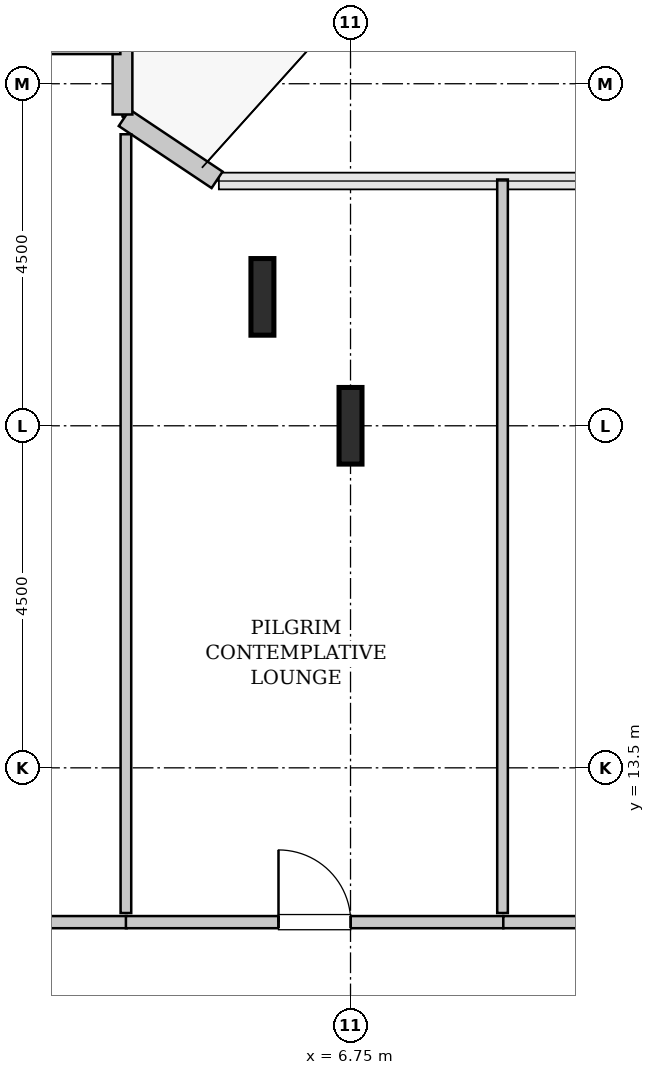
"""IFC4 building model, lengths in metres.
Left out: names, types, materials, properties, quantities, classifications, styles, units other than length and angle.
Written with IfcOpenShell. Run it as: python <this file> out.ifc"""

import sys

from ifc_helpers import new_model, si_unit, direction, frame, frame_2d, origin, origin_2d, place, context, subcontext, project, spatial, rectangle, i_section, extrude, source, transform, mapped, element, fill, save


model = new_model("IFC4")
c1 = context("Model", 3, precision=1e-05, world=origin(), true_north=direction((0.0, 1.0)))
c2 = subcontext(c1, "Body", "Model", "MODEL_VIEW")
j1 = project(units=[si_unit("LENGTHUNIT", "METRE"), si_unit("PLANEANGLEUNIT", "RADIAN")], contexts=[c1])
p1 = place(None, origin())
s1 = spatial("IfcSite", under=j1, at=p1, CompositionType="ELEMENT")
p2 = place(p1, origin())
s2 = spatial("IfcBuilding", under=s1, at=p2, CompositionType="ELEMENT")
p3 = place(p2, frame((0.0, 0.0, 78.6)))
s3 = spatial("IfcBuildingStorey", under=s2, at=p3, CompositionType="ELEMENT", Elevation=78.6)
m1 = source(origin(), c2, "Body", "SweptSolid", [
    extrude(i_section(OverallWidth=0.302, OverallDepth=1.008, WebThickness=0.021, FlangeThickness=0.04, FilletRadius=0.03, at=origin_2d()), origin(), (0.0, 0.0, 1.0), 3.8),
])
for number, where, z_axis, x_axis in (
    (1, (5.591, 19.696, 0.0), (0.0, 0.0, 1.0), (1.0, 0.0, 0.0)),
    (2, (6.75, 18.0, 0.0), (0.0, 0.0, 1.0), (1.0, 0.0, 0.0)),
):
    element("IfcColumn", number, at=place(p3, frame(where, z_axis=z_axis, x_axis=x_axis)), inside=s3, PredefinedType="COLUMN", context=c2, shape_type="MappedRepresentation", body=[
        mapped(m1, transform((0.0, 0.0, 0.0), x_axis=(1.0, 0.0, 0.0), y_axis=(0.0, 1.0, 0.0), z_axis=(0.0, 0.0, 1.0), scale=1.0)),
    ])
m2 = source(origin(), c2, "Body", "SweptSolid", [
    extrude(rectangle(XDim=1.469, YDim=0.26, at=frame_2d((0.734, 0.0))), origin(), (0.0, 0.0, 1.0), 3.55),
])
p4 = place(p3, frame((4.995, 21.236, 0.0), z_axis=(0.0, 0.0, 1.0), x_axis=(-0.831461760506, 0.555581983884, 0.0)))
e3 = element("IfcWall", 3, at=p4, inside=s3, PredefinedType="SOLIDWALL", context=c2, shape_type="MappedRepresentation", body=[
    mapped(m2, transform((0.0, 0.0, 0.0), x_axis=(1.0, 0.0, 0.0), y_axis=(0.0, 1.0, 0.0), z_axis=(0.0, 0.0, 1.0), scale=1.0)),
])
m3 = source(origin(), c2, "Body", "SweptSolid", [
    extrude(rectangle(XDim=0.897, YDim=0.26, at=frame_2d((0.448, 0.0))), origin(), (0.0, 0.0, 1.0), 3.55),
])
p5 = place(p3, frame((3.75, 22.095, 0.0), z_axis=(0.0, 0.0, 1.0), x_axis=(0.0, 1.0, 0.0)))
e4 = element("IfcWall", 4, at=p5, inside=s3, PredefinedType="SOLIDWALL", context=c2, shape_type="MappedRepresentation", body=[
    mapped(m3, transform((0.0, 0.0, 0.0), x_axis=(1.0, 0.0, 0.0), y_axis=(0.0, 1.0, 0.0), z_axis=(0.0, 0.0, 1.0), scale=1.0)),
])
m4 = source(origin(), c2, "Body", "SweptSolid", [
    extrude(rectangle(XDim=1.37, YDim=0.26, at=frame_2d((0.685, 0.0))), origin(), (0.0, 0.0, 1.0), 3.55),
])
p6 = place(p3, frame((3.722, 23.02, 0.0), z_axis=(0.0, 0.0, 1.0), x_axis=(-1.0, 0.0, 0.0)))
e5 = element("IfcWall", 5, at=p6, inside=s3, PredefinedType="SOLIDWALL", context=c2, shape_type="MappedRepresentation", body=[
    mapped(m4, transform((0.0, 0.0, 0.0), x_axis=(1.0, 0.0, 0.0), y_axis=(0.0, 1.0, 0.0), z_axis=(0.0, 0.0, 1.0), scale=1.0)),
])
m5 = source(origin(), c2, "Body", "SweptSolid", [
    extrude(rectangle(XDim=5.605, YDim=0.16, at=frame_2d((2.802, 0.0))), origin(), (0.0, 0.0, 1.0), 3.535),
])
p7 = place(p3, frame((-1.8, 11.47, 0.0), z_axis=(0.0, 0.0, 1.0), x_axis=(1.0, 0.0, 0.0)))
e6 = element("IfcWall", 6, at=p7, inside=s3, PredefinedType="PARTITIONING", context=c2, shape_type="MappedRepresentation", body=[
    mapped(m5, transform((0.0, 0.0, 0.0), x_axis=(1.0, 0.0, 0.0), y_axis=(0.0, 1.0, 0.0), z_axis=(0.0, 0.0, 1.0), scale=1.0)),
])
p8 = place(p7, frame((2.327, 0.0, 0.0)))
e7 = element("IfcOpeningElement", 7, at=p8, cuts=e6, PredefinedType="OPENING", context=c2, shape_type="SweptSolid", body=[
    extrude(rectangle(XDim=0.95, YDim=2.1, at=frame_2d((0.475, 1.05))), frame((0.0, 0.09, 0.0), z_axis=(0.0, -1.0, 0.0), x_axis=(1.0, 0.0, 0.0)), (0.0, 0.0, 1.0), 0.18),
])
m6 = source(origin(), c2, "Body", "SweptSolid", [
    extrude(rectangle(XDim=10.245, YDim=0.14, at=frame_2d((5.123, 0.0))), origin(), (0.0, 0.0, 1.0), 3.535),
])
p9 = place(p3, frame((3.795, 11.59, 0.0), z_axis=(0.0, 0.0, 1.0), x_axis=(0.0, 1.0, 0.0)))
e8 = element("IfcWall", 8, at=p9, inside=s3, PredefinedType="PARTITIONING", context=c2, shape_type="MappedRepresentation", body=[
    mapped(m6, transform((0.0, 0.0, 0.0), x_axis=(1.0, 0.0, 0.0), y_axis=(0.0, 1.0, 0.0), z_axis=(0.0, 0.0, 1.0), scale=1.0)),
])
m7 = source(origin(), c2, "Body", "SweptSolid", [
    extrude(rectangle(XDim=4.965, YDim=0.16, at=frame_2d((2.482, 0.0))), origin(), (0.0, 0.0, 1.0), 3.535),
])
p10 = place(p3, frame((3.795, 11.47, 0.0), z_axis=(0.0, 0.0, 1.0), x_axis=(1.0, 0.0, 0.0)))
e9 = element("IfcWall", 9, at=p10, inside=s3, PredefinedType="PARTITIONING", context=c2, shape_type="MappedRepresentation", body=[
    mapped(m7, transform((0.0, 0.0, 0.0), x_axis=(1.0, 0.0, 0.0), y_axis=(0.0, 1.0, 0.0), z_axis=(0.0, 0.0, 1.0), scale=1.0)),
])
p11 = place(p10, frame((2.008, 0.0, 0.0)))
e10 = element("IfcOpeningElement", 10, at=p11, cuts=e9, PredefinedType="OPENING", context=c2, shape_type="SweptSolid", body=[
    extrude(rectangle(XDim=0.95, YDim=2.1, at=frame_2d((0.475, 1.05))), frame((0.0, 0.09, 0.0), z_axis=(0.0, -1.0, 0.0), x_axis=(1.0, 0.0, 0.0)), (0.0, 0.0, 1.0), 0.18),
])
m8 = source(origin(), c2, "Body", "SweptSolid", [
    extrude(rectangle(XDim=9.65, YDim=0.14, at=frame_2d((4.825, 0.0))), origin(), (0.0, 0.0, 1.0), 3.535),
])
p12 = place(p3, frame((8.75, 11.59, 0.0), z_axis=(0.0, 0.0, 1.0), x_axis=(0.0, 1.0, 0.0)))
e11 = element("IfcWall", 11, at=p12, inside=s3, PredefinedType="PARTITIONING", context=c2, shape_type="MappedRepresentation", body=[
    mapped(m8, transform((0.0, 0.0, 0.0), x_axis=(1.0, 0.0, 0.0), y_axis=(0.0, 1.0, 0.0), z_axis=(0.0, 0.0, 1.0), scale=1.0)),
])
m9 = source(origin(), c2, "Body", "SweptSolid", [
    extrude(rectangle(XDim=4.86, YDim=0.16, at=frame_2d((2.43, 0.0))), origin(), (0.0, 0.0, 1.0), 3.535),
])
p13 = place(p3, frame((8.76, 11.47, 0.0), z_axis=(0.0, 0.0, 1.0), x_axis=(1.0, 0.0, 0.0)))
e12 = element("IfcWall", 12, at=p13, inside=s3, PredefinedType="PARTITIONING", context=c2, shape_type="MappedRepresentation", body=[
    mapped(m9, transform((0.0, 0.0, 0.0), x_axis=(1.0, 0.0, 0.0), y_axis=(0.0, 1.0, 0.0), z_axis=(0.0, 0.0, 1.0), scale=1.0)),
])
p14 = place(p13, frame((1.955, 0.0, 0.0)))
e13 = element("IfcOpeningElement", 13, at=p14, cuts=e12, PredefinedType="OPENING", context=c2, shape_type="SweptSolid", body=[
    extrude(rectangle(XDim=0.95, YDim=2.1, at=frame_2d((0.475, 1.05))), frame((0.0, 0.09, 0.0), z_axis=(0.0, -1.0, 0.0), x_axis=(1.0, 0.0, 0.0)), (0.0, 0.0, 1.0), 0.18),
])
m10 = source(origin(), c2, "Body", "SweptSolid", [
    extrude(rectangle(XDim=0.95, YDim=2.1, at=frame_2d((0.475, 1.05))), frame((0.0, 0.025, 0.0), z_axis=(0.0, -1.0, 0.0), x_axis=(1.0, 0.0, 0.0)), (0.0, 0.0, 1.0), 0.05),
])
p15 = place(p11, origin())
e14 = element("IfcDoor", 14, at=p15, inside=s3, OperationType="SINGLE_SWING_LEFT", PredefinedType="DOOR", context=c2, shape_type="MappedRepresentation", body=[
    mapped(m10, transform((0.0, 0.0, 0.0), x_axis=(1.0, 0.0, 0.0), y_axis=(0.0, 1.0, 0.0), z_axis=(0.0, 0.0, 1.0), scale=1.0)),
])
fill(e10, e14)
save(model, sys.argv[1])
